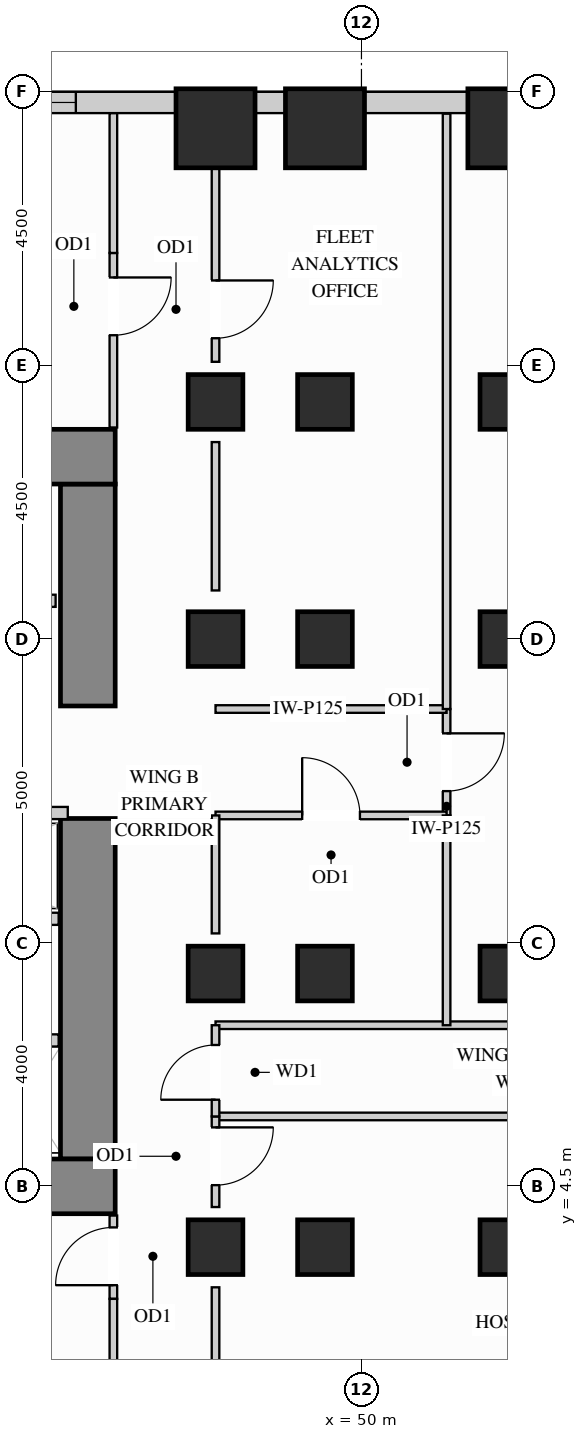
"""IFC4 building model, lengths in metres.
Left out: names, types, materials, properties, quantities, classifications, styles, units other than length and angle.
Written with IfcOpenShell. Run it as: python <this file> out.ifc"""

import sys

from ifc_helpers import new_model, si_unit, direction, frame, frame_2d, origin, origin_2d, place, context, subcontext, project, spatial, rectangle, extrude, source, transform, mapped, element, fill, save


model = new_model("IFC4")
c1 = context("Model", 3, precision=1e-05, world=origin(), true_north=direction((0.0, 1.0)))
c2 = subcontext(c1, "Body", "Model", "MODEL_VIEW")
j1 = project(units=[si_unit("LENGTHUNIT", "METRE"), si_unit("PLANEANGLEUNIT", "RADIAN")], contexts=[c1])
p1 = place(None, origin())
s1 = spatial("IfcSite", under=j1, at=p1, CompositionType="ELEMENT")
p2 = place(p1, origin())
s2 = spatial("IfcBuilding", under=s1, at=p2, CompositionType="ELEMENT")
p3 = place(p2, frame((0.0, 0.0, 40.5)))
s3 = spatial("IfcBuildingStorey", under=s2, at=p3, CompositionType="ELEMENT", Elevation=40.5)
m1 = source(origin(), c2, "Body", "SweptSolid", [
    extrude(rectangle(XDim=0.9, YDim=0.9, at=origin_2d()), origin(), (0.0, 0.0, 1.0), 3.38),
])
for number, where, z_axis, x_axis in (
    (1, (47.6, 13.5, 0.0), (0.0, 0.0, 1.0), (1.0, 0.0, 0.0)),
    (2, (47.6, 3.5, 0.0), (0.0, 0.0, 1.0), (1.0, 0.0, 0.0)),
    (3, (47.6, 8.0, 0.0), (0.0, 0.0, 1.0), (1.0, 0.0, 0.0)),
    (4, (47.6, 17.4, 0.0), (0.0, 0.0, 1.0), (1.0, 0.0, 0.0)),
    (5, (49.4, 13.5, 0.0), (0.0, 0.0, 1.0), (1.0, 0.0, 0.0)),
    (6, (49.4, 17.4, 0.0), (0.0, 0.0, 1.0), (1.0, 0.0, 0.0)),
    (7, (49.4, 3.5, 0.0), (0.0, 0.0, 1.0), (1.0, 0.0, 0.0)),
    (8, (49.4, 8.0, 0.0), (0.0, 0.0, 1.0), (1.0, 0.0, 0.0)),
    (9, (52.4, 13.5, 0.0), (0.0, 0.0, 1.0), (1.0, 0.0, 0.0)),
    (10, (52.4, 17.4, 0.0), (0.0, 0.0, 1.0), (1.0, 0.0, 0.0)),
    (11, (52.4, 3.5, 0.0), (0.0, 0.0, 1.0), (1.0, 0.0, 0.0)),
    (12, (52.4, 8.0, 0.0), (0.0, 0.0, 1.0), (1.0, 0.0, 0.0)),
):
    element("IfcColumn", number, at=place(p3, frame(where, z_axis=z_axis, x_axis=x_axis)), inside=s3, PredefinedType="COLUMN", context=c2, shape_type="MappedRepresentation", body=[
        mapped(m1, transform((0.0, 0.0, 0.0), x_axis=(1.0, 0.0, 0.0), y_axis=(0.0, 1.0, 0.0), z_axis=(0.0, 0.0, 1.0))),
    ])
m2 = source(origin(), c2, "Body", "SweptSolid", [
    extrude(rectangle(XDim=1.3, YDim=1.3, at=origin_2d()), origin(), (0.0, 0.0, 1.0), 3.38),
])
for number, where, z_axis, x_axis in (
    (13, (47.6, 21.9, 0.0), (0.0, 0.0, 1.0), (1.0, 0.0, 0.0)),
    (14, (49.4, 21.9, 0.0), (0.0, 0.0, 1.0), (1.0, 0.0, 0.0)),
    (15, (52.4, 21.9, 0.0), (0.0, 0.0, 1.0), (1.0, 0.0, 0.0)),
):
    element("IfcColumn", number, at=place(p3, frame(where, z_axis=z_axis, x_axis=x_axis)), inside=s3, PredefinedType="COLUMN", context=c2, shape_type="MappedRepresentation", body=[
        mapped(m2, transform((0.0, 0.0, 0.0), x_axis=(1.0, 0.0, 0.0), y_axis=(0.0, 1.0, 0.0), z_axis=(0.0, 0.0, 1.0))),
    ])
m3 = source(origin(), c2, "Body", "SweptSolid", [
    extrude(rectangle(XDim=5.6, YDim=0.9, at=frame_2d((2.8, 0.0))), origin(), (0.0, 0.0, 1.0), 3.38),
])
p4 = place(p3, frame((45.5, 4.95, 0.0), z_axis=(0.0, 0.0, 1.0), x_axis=(0.0, 1.0, 0.0)))
e16 = element("IfcWall", 16, at=p4, inside=s3, PredefinedType="SHEAR", context=c2, shape_type="MappedRepresentation", body=[
    mapped(m3, transform((0.0, 0.0, 0.0), x_axis=(1.0, 0.0, 0.0), y_axis=(0.0, 1.0, 0.0), z_axis=(0.0, 0.0, 1.0))),
])
m4 = source(origin(), c2, "Body", "SweptSolid", [
    extrude(rectangle(XDim=3.65, YDim=0.9, at=frame_2d((1.825, 0.0))), origin(), (0.0, 0.0, 1.0), 3.38),
])
p5 = place(p3, frame((45.5, 12.4, 0.0), z_axis=(0.0, 0.0, 1.0), x_axis=(0.0, 1.0, 0.0)))
e17 = element("IfcWall", 17, at=p5, inside=s3, PredefinedType="SHEAR", context=c2, shape_type="MappedRepresentation", body=[
    mapped(m4, transform((0.0, 0.0, 0.0), x_axis=(1.0, 0.0, 0.0), y_axis=(0.0, 1.0, 0.0), z_axis=(0.0, 0.0, 1.0))),
])
m5 = source(origin(), c2, "Body", "SweptSolid", [
    extrude(rectangle(XDim=10.4, YDim=0.9, at=frame_2d((5.2, 0.0))), origin(), (0.0, 0.0, 1.0), 3.38),
])
for number, where, z_axis, x_axis in (
    (18, (35.55, 16.5, 0.0), (0.0, 0.0, 1.0), (1.0, 0.0, 0.0)),
    (19, (35.55, 4.5, 0.0), (0.0, 0.0, 1.0), (1.0, 0.0, 0.0)),
):
    element("IfcWall", number, at=place(p3, frame(where, z_axis=z_axis, x_axis=x_axis)), inside=s3, PredefinedType="SHEAR", context=c2, shape_type="MappedRepresentation", body=[
        mapped(m5, transform((0.0, 0.0, 0.0), x_axis=(1.0, 0.0, 0.0), y_axis=(0.0, 1.0, 0.0), z_axis=(0.0, 0.0, 1.0))),
    ])
m6 = source(origin(), c2, "Body", "SweptSolid", [
    extrude(rectangle(XDim=1.704, YDim=0.35, at=frame_2d((0.852, 0.0))), origin(), (0.0, 0.0, 1.0), 2.51),
])
p6 = place(p3, frame((51.752, 22.325, 0.0), z_axis=(0.0, 0.0, 1.0), x_axis=(-1.0, 0.0, 0.0)))
e20 = element("IfcWall", 20, at=p6, inside=s3, PredefinedType="SOLIDWALL", context=c2, shape_type="MappedRepresentation", body=[
    mapped(m6, transform((0.0, 0.0, 0.0), x_axis=(1.0, 0.0, 0.0), y_axis=(0.0, 1.0, 0.0), z_axis=(0.0, 0.0, 1.0))),
])
m7 = source(origin(), c2, "Body", "SweptSolid", [
    extrude(rectangle(XDim=0.504, YDim=0.35, at=frame_2d((0.252, 0.0))), origin(), (0.0, 0.0, 1.0), 3.365),
])
p7 = place(p3, frame((48.752, 22.325, 0.0), z_axis=(0.0, 0.0, 1.0), x_axis=(-1.0, 0.0, 0.0)))
e21 = element("IfcWall", 21, at=p7, inside=s3, PredefinedType="SOLIDWALL", context=c2, shape_type="MappedRepresentation", body=[
    mapped(m7, transform((0.0, 0.0, 0.0), x_axis=(1.0, 0.0, 0.0), y_axis=(0.0, 1.0, 0.0), z_axis=(0.0, 0.0, 1.0))),
])
p8 = place(p3, frame((46.952, 22.325, 0.0), z_axis=(0.0, 0.0, 1.0), x_axis=(-1.0, 0.0, 0.0)))
e22 = element("IfcWall", 22, at=p8, inside=s3, PredefinedType="SOLIDWALL", context=c2, shape_type="SweptSolid", body=[
    extrude(rectangle(XDim=6.304, YDim=0.35, at=frame_2d((3.152, 0.0))), origin(), (0.0, 0.0, 1.0), 2.51),
])
p9 = place(p8, frame((1.649, 0.0, 0.78)))
e23 = element("IfcOpeningElement", 23, at=p9, cuts=e22, PredefinedType="OPENING", context=c2, shape_type="SweptSolid", body=[
    extrude(rectangle(XDim=1.8, YDim=1.55, at=frame_2d((0.9, 0.775))), frame((0.0, 0.185, 0.0), z_axis=(0.0, -1.0, 0.0), x_axis=(1.0, 0.0, 0.0)), (0.0, 0.0, 1.0), 0.37),
])
p10 = place(p8, frame((3.817, 0.0, 0.78)))
e24 = element("IfcOpeningElement", 24, at=p10, cuts=e22, PredefinedType="OPENING", context=c2, shape_type="SweptSolid", body=[
    extrude(rectangle(XDim=1.8, YDim=1.55, at=frame_2d((0.9, 0.775))), frame((0.0, 0.185, 0.0), z_axis=(0.0, -1.0, 0.0), x_axis=(1.0, 0.0, 0.0)), (0.0, 0.0, 1.0), 0.37),
])
p11 = place(p3, frame((51.4, 10.6, 0.0), z_axis=(0.0, 0.0, 1.0), x_axis=(0.0, 1.0, 0.0)))
e25 = element("IfcWall", 25, at=p11, inside=s3, PredefinedType="PARTITIONING", context=c2, shape_type="SweptSolid", body=[
    extrude(rectangle(XDim=1.75, YDim=0.125, at=frame_2d((0.875, 0.0))), origin(), (0.0, 0.0, 1.0), 3.365),
])
p12 = place(p11, frame((0.4, 0.0, 0.0)))
e26 = element("IfcOpeningElement", 26, at=p12, cuts=e25, PredefinedType="OPENING", context=c2, shape_type="SweptSolid", body=[
    extrude(rectangle(XDim=0.95, YDim=2.15, at=frame_2d((0.475, 1.075))), frame((0.0, 0.073, 0.0), z_axis=(0.0, -1.0, 0.0), x_axis=(1.0, 0.0, 0.0)), (0.0, 0.0, 1.0), 0.145),
])
m8 = source(origin(), c2, "Body", "SweptSolid", [
    extrude(rectangle(XDim=11.048, YDim=0.125, at=frame_2d((5.524, 0.0))), origin(), (0.0, 0.0, 1.0), 3.365),
])
for number, where, z_axis, x_axis in (
    (27, (47.6, 5.65, 0.0), (0.0, 0.0, 1.0), (1.0, 0.0, 0.0)),
    (28, (47.6, 7.15, 0.0), (0.0, 0.0, 1.0), (1.0, 0.0, 0.0)),
):
    element("IfcWall", number, at=place(p3, frame(where, z_axis=z_axis, x_axis=x_axis)), inside=s3, PredefinedType="PARTITIONING", context=c2, shape_type="MappedRepresentation", body=[
        mapped(m8, transform((0.0, 0.0, 0.0), x_axis=(1.0, 0.0, 0.0), y_axis=(0.0, 1.0, 0.0), z_axis=(0.0, 0.0, 1.0))),
    ])
m9 = source(origin(), c2, "Body", "SweptSolid", [
    extrude(rectangle(XDim=3.8, YDim=0.125, at=frame_2d((1.9, 0.0))), origin(), (0.0, 0.0, 1.0), 3.365),
])
p13 = place(p3, frame((47.6, 12.35, 0.0), z_axis=(0.0, 0.0, 1.0), x_axis=(1.0, 0.0, 0.0)))
e29 = element("IfcWall", 29, at=p13, inside=s3, PredefinedType="PARTITIONING", context=c2, shape_type="MappedRepresentation", body=[
    mapped(m9, transform((0.0, 0.0, 0.0), x_axis=(1.0, 0.0, 0.0), y_axis=(0.0, 1.0, 0.0), z_axis=(0.0, 0.0, 1.0))),
])
p14 = place(p3, frame((47.6, 10.6, 0.0), z_axis=(0.0, 0.0, 1.0), x_axis=(1.0, 0.0, 0.0)))
e30 = element("IfcWall", 30, at=p14, inside=s3, PredefinedType="PARTITIONING", context=c2, shape_type="SweptSolid", body=[
    extrude(rectangle(XDim=3.8, YDim=0.125, at=frame_2d((1.9, 0.0))), origin(), (0.0, 0.0, 1.0), 2.67),
])
p15 = place(p14, frame((1.425, 0.0, 0.0)))
e31 = element("IfcOpeningElement", 31, at=p15, cuts=e30, PredefinedType="OPENING", context=c2, shape_type="SweptSolid", body=[
    extrude(rectangle(XDim=0.95, YDim=2.15, at=frame_2d((0.475, 1.075))), frame((0.0, 0.073, 0.0), z_axis=(0.0, -1.0, 0.0), x_axis=(1.0, 0.0, 0.0)), (0.0, 0.0, 1.0), 0.145),
])
m10 = source(origin(), c2, "Body", "SweptSolid", [
    extrude(rectangle(XDim=3.45, YDim=0.125, at=frame_2d((1.725, 0.0))), origin(), (0.0, 0.0, 1.0), 3.365),
])
p16 = place(p3, frame((51.4, 7.15, 0.0), z_axis=(0.0, 0.0, 1.0), x_axis=(0.0, 1.0, 0.0)))
e32 = element("IfcWall", 32, at=p16, inside=s3, PredefinedType="PARTITIONING", context=c2, shape_type="MappedRepresentation", body=[
    mapped(m10, transform((0.0, 0.0, 0.0), x_axis=(1.0, 0.0, 0.0), y_axis=(0.0, 1.0, 0.0), z_axis=(0.0, 0.0, 1.0))),
])
m11 = source(origin(), c2, "Body", "SweptSolid", [
    extrude(rectangle(XDim=9.79, YDim=0.125, at=frame_2d((4.895, 0.0))), origin(), (0.0, 0.0, 1.0), 3.365),
])
p17 = place(p3, frame((51.4, 12.35, 0.0), z_axis=(0.0, 0.0, 1.0), x_axis=(0.0, 1.0, 0.0)))
e33 = element("IfcWall", 33, at=p17, inside=s3, PredefinedType="PARTITIONING", context=c2, shape_type="MappedRepresentation", body=[
    mapped(m11, transform((0.0, 0.0, 0.0), x_axis=(1.0, 0.0, 0.0), y_axis=(0.0, 1.0, 0.0), z_axis=(0.0, 0.0, 1.0))),
])
p18 = place(p3, frame((47.6, 4.16, 0.0), z_axis=(0.0, 0.0, 1.0), x_axis=(0.0, 1.0, 0.0)))
e34 = element("IfcWall", 34, at=p18, inside=s3, PredefinedType="PARTITIONING", context=c2, shape_type="SweptSolid", body=[
    extrude(rectangle(XDim=1.49, YDim=0.125, at=frame_2d((0.745, 0.0))), origin(), (0.0, 0.0, 1.0), 2.67),
])
p19 = place(p18, frame((0.36, 0.0, 0.0)))
e35 = element("IfcOpeningElement", 35, at=p19, cuts=e34, PredefinedType="OPENING", context=c2, shape_type="SweptSolid", body=[
    extrude(rectangle(XDim=0.95, YDim=2.15, at=frame_2d((0.475, 1.075))), frame((0.0, 0.073, 0.0), z_axis=(0.0, -1.0, 0.0), x_axis=(1.0, 0.0, 0.0)), (0.0, 0.0, 1.0), 0.145),
])
m12 = source(origin(), c2, "Body", "SweptSolid", [
    extrude(rectangle(XDim=1.58, YDim=0.125, at=frame_2d((0.79, 0.0))), origin(), (0.0, 0.0, 1.0), 2.67),
])
p20 = place(p3, frame((47.6, 1.26, 0.0), z_axis=(0.0, 0.0, 1.0), x_axis=(0.0, 1.0, 0.0)))
e36 = element("IfcWall", 36, at=p20, inside=s3, PredefinedType="PARTITIONING", context=c2, shape_type="MappedRepresentation", body=[
    mapped(m12, transform((0.0, 0.0, 0.0), x_axis=(1.0, 0.0, 0.0), y_axis=(0.0, 1.0, 0.0), z_axis=(0.0, 0.0, 1.0))),
])
m13 = source(origin(), c2, "Body", "SweptSolid", [
    extrude(rectangle(XDim=1.94, YDim=0.125, at=frame_2d((0.97, 0.0))), origin(), (0.0, 0.0, 1.0), 2.67),
])
p21 = place(p3, frame((47.6, 8.66, 0.0), z_axis=(0.0, 0.0, 1.0), x_axis=(0.0, 1.0, 0.0)))
e37 = element("IfcWall", 37, at=p21, inside=s3, PredefinedType="PARTITIONING", context=c2, shape_type="MappedRepresentation", body=[
    mapped(m13, transform((0.0, 0.0, 0.0), x_axis=(1.0, 0.0, 0.0), y_axis=(0.0, 1.0, 0.0), z_axis=(0.0, 0.0, 1.0))),
])
m14 = source(origin(), c2, "Body", "SweptSolid", [
    extrude(rectangle(XDim=2.44, YDim=0.125, at=frame_2d((1.22, 0.0))), origin(), (0.0, 0.0, 1.0), 2.67),
])
p22 = place(p3, frame((47.6, 14.3, 0.0), z_axis=(0.0, 0.0, 1.0), x_axis=(0.0, 1.0, 0.0)))
e38 = element("IfcWall", 38, at=p22, inside=s3, PredefinedType="PARTITIONING", context=c2, shape_type="MappedRepresentation", body=[
    mapped(m14, transform((0.0, 0.0, 0.0), x_axis=(1.0, 0.0, 0.0), y_axis=(0.0, 1.0, 0.0), z_axis=(0.0, 0.0, 1.0))),
])
p23 = place(p3, frame((47.6, 18.06, 0.0), z_axis=(0.0, 0.0, 1.0), x_axis=(0.0, 1.0, 0.0)))
e39 = element("IfcWall", 39, at=p23, inside=s3, PredefinedType="PARTITIONING", context=c2, shape_type="SweptSolid", body=[
    extrude(rectangle(XDim=3.18, YDim=0.125, at=frame_2d((1.59, 0.0))), origin(), (0.0, 0.0, 1.0), 2.67),
])
p24 = place(p23, frame((0.388, 0.0, 0.0)))
e40 = element("IfcOpeningElement", 40, at=p24, cuts=e39, PredefinedType="OPENING", context=c2, shape_type="SweptSolid", body=[
    extrude(rectangle(XDim=0.95, YDim=2.15, at=frame_2d((0.475, 1.075))), frame((0.0, 0.073, 0.0), z_axis=(0.0, -1.0, 0.0), x_axis=(1.0, 0.0, 0.0)), (0.0, 0.0, 1.0), 0.145),
])
p25 = place(p3, frame((47.6, 5.65, 0.0), z_axis=(0.0, 0.0, 1.0), x_axis=(0.0, 1.0, 0.0)))
e41 = element("IfcWall", 41, at=p25, inside=s3, PredefinedType="PARTITIONING", context=c2, shape_type="SweptSolid", body=[
    extrude(rectangle(XDim=1.5, YDim=0.125, at=frame_2d((0.75, 0.0))), origin(), (0.0, 0.0, 1.0), 2.67),
])
p26 = place(p25, frame((0.275, 0.0, 0.0)))
e42 = element("IfcOpeningElement", 42, at=p26, cuts=e41, PredefinedType="OPENING", context=c2, shape_type="SweptSolid", body=[
    extrude(rectangle(XDim=0.9, YDim=2.15, at=frame_2d((0.45, 1.075))), frame((0.0, 0.073, 0.0), z_axis=(0.0, -1.0, 0.0), x_axis=(1.0, 0.0, 0.0)), (0.0, 0.0, 1.0), 0.145),
])
p27 = place(p3, frame((45.92, 16.98, 0.0), z_axis=(0.0, 0.0, 1.0), x_axis=(0.0, 1.0, 0.0)))
e43 = element("IfcWall", 43, at=p27, inside=s3, PredefinedType="PARTITIONING", context=c2, shape_type="SweptSolid", body=[
    extrude(rectangle(XDim=2.87, YDim=0.125, at=frame_2d((1.435, 0.0))), origin(), (0.0, 0.0, 1.0), 3.365),
])
p28 = place(p27, frame((1.517, 0.0, 0.0)))
e44 = element("IfcOpeningElement", 44, at=p28, cuts=e43, PredefinedType="OPENING", context=c2, shape_type="SweptSolid", body=[
    extrude(rectangle(XDim=0.95, YDim=2.15, at=frame_2d((0.475, 1.075))), frame((0.0, 0.073, 0.0), z_axis=(0.0, -1.0, 0.0), x_axis=(1.0, 0.0, 0.0)), (0.0, 0.0, 1.0), 0.145),
])
m15 = source(origin(), c2, "Body", "SweptSolid", [
    extrude(rectangle(XDim=2.298, YDim=0.125, at=frame_2d((1.149, 0.0))), origin(), (0.0, 0.0, 1.0), 3.365),
])
p29 = place(p3, frame((45.92, 19.85, 0.0), z_axis=(0.0, 0.0, 1.0), x_axis=(0.0, 1.0, 0.0)))
e45 = element("IfcWall", 45, at=p29, inside=s3, PredefinedType="PARTITIONING", context=c2, shape_type="MappedRepresentation", body=[
    mapped(m15, transform((0.0, 0.0, 0.0), x_axis=(1.0, 0.0, 0.0), y_axis=(0.0, 1.0, 0.0), z_axis=(0.0, 0.0, 1.0))),
])
p30 = place(p3, frame((45.92, 2.65, 0.0), z_axis=(0.0, 0.0, 1.0), x_axis=(0.0, 1.0, 0.0)))
e46 = element("IfcWall", 46, at=p30, inside=s3, PredefinedType="PARTITIONING", context=c2, shape_type="SweptSolid", body=[
    extrude(rectangle(XDim=1.37, YDim=0.125, at=frame_2d((0.685, 0.0))), origin(), (0.0, 0.0, 1.0), 3.365),
])
p31 = place(p30, frame((0.225, 0.0, 0.0)))
e47 = element("IfcOpeningElement", 47, at=p31, cuts=e46, PredefinedType="OPENING", context=c2, shape_type="SweptSolid", body=[
    extrude(rectangle(XDim=0.95, YDim=2.15, at=frame_2d((0.475, 1.075))), frame((0.0, 0.073, 0.0), z_axis=(0.0, -1.0, 0.0), x_axis=(1.0, 0.0, 0.0)), (0.0, 0.0, 1.0), 0.145),
])
p32 = place(p3, frame((45.92, 0.352, 0.0), z_axis=(0.0, 0.0, 1.0), x_axis=(0.0, 1.0, 0.0)))
e48 = element("IfcWall", 48, at=p32, inside=s3, PredefinedType="PARTITIONING", context=c2, shape_type="MappedRepresentation", body=[
    mapped(m15, transform((0.0, 0.0, 0.0), x_axis=(1.0, 0.0, 0.0), y_axis=(0.0, 1.0, 0.0), z_axis=(0.0, 0.0, 1.0))),
])
m16 = source(origin(), c2, "Body", "SweptSolid", [
    extrude(rectangle(XDim=1.17, YDim=0.2, at=frame_2d((0.585, 0.0))), origin(), (0.0, 0.0, 1.0), 3.365),
])
p33 = place(p3, frame((43.85, 6.9, 0.0), z_axis=(0.0, 0.0, 1.0), x_axis=(1.0, 0.0, 0.0)))
e49 = element("IfcWall", 49, at=p33, inside=s3, PredefinedType="PARTITIONING", context=c2, shape_type="MappedRepresentation", body=[
    mapped(m16, transform((0.0, 0.0, 0.0), x_axis=(1.0, 0.0, 0.0), y_axis=(0.0, 1.0, 0.0), z_axis=(0.0, 0.0, 1.0))),
])
p34 = place(p3, frame((42.23, 14.13, 0.0), z_axis=(0.0, 0.0, 1.0), x_axis=(1.0, 0.0, 0.0)))
e50 = element("IfcWall", 50, at=p34, inside=s3, PredefinedType="PARTITIONING", context=c2, shape_type="SweptSolid", body=[
    extrude(rectangle(XDim=2.74, YDim=0.2, at=frame_2d((1.37, 0.0))), origin(), (0.0, 0.0, 1.0), 3.365),
])
p35 = place(p34, frame((0.82, 0.0, 0.0)))
e51 = element("IfcOpeningElement", 51, at=p35, cuts=e50, PredefinedType="OPENING", context=c2, shape_type="SweptSolid", body=[
    extrude(rectangle(XDim=1.1, YDim=2.2, at=frame_2d((0.55, 1.1))), frame((0.0, 0.11, 0.0), z_axis=(0.0, -1.0, 0.0), x_axis=(1.0, 0.0, 0.0)), (0.0, 0.0, 1.0), 0.22),
])
m17 = source(origin(), c2, "Body", "SweptSolid", [
    extrude(rectangle(XDim=3.49, YDim=0.2, at=frame_2d((1.745, 0.0))), origin(), (0.0, 0.0, 1.0), 3.365),
])
p36 = place(p3, frame((41.68, 10.64, 0.0), z_axis=(0.0, 0.0, 1.0), x_axis=(1.0, 0.0, 0.0)))
e52 = element("IfcWall", 52, at=p36, inside=s3, PredefinedType="PARTITIONING", context=c2, shape_type="MappedRepresentation", body=[
    mapped(m17, transform((0.0, 0.0, 0.0), x_axis=(1.0, 0.0, 0.0), y_axis=(0.0, 1.0, 0.0), z_axis=(0.0, 0.0, 1.0))),
])
m18 = source(origin(), c2, "Body", "SweptSolid", [
    extrude(rectangle(XDim=3.34, YDim=0.2, at=frame_2d((1.67, 0.0))), origin(), (0.0, 0.0, 1.0), 3.365),
])
p37 = place(p3, frame((41.68, 8.9, 0.0), z_axis=(0.0, 0.0, 1.0), x_axis=(1.0, 0.0, 0.0)))
e53 = element("IfcWall", 53, at=p37, inside=s3, PredefinedType="PARTITIONING", context=c2, shape_type="MappedRepresentation", body=[
    mapped(m18, transform((0.0, 0.0, 0.0), x_axis=(1.0, 0.0, 0.0), y_axis=(0.0, 1.0, 0.0), z_axis=(0.0, 0.0, 1.0))),
])
m19 = source(origin(), c2, "Body", "SweptSolid", [
    extrude(rectangle(XDim=0.95, YDim=2.15, at=frame_2d((0.475, 1.075))), frame((0.0, 0.025, 0.0), z_axis=(0.0, -1.0, 0.0), x_axis=(1.0, 0.0, 0.0)), (0.0, 0.0, 1.0), 0.05),
])
p38 = place(p28, origin())
e54 = element("IfcDoor", 54, at=p38, inside=s3, OperationType="SINGLE_SWING_RIGHT", PredefinedType="DOOR", context=c2, shape_type="MappedRepresentation", body=[
    mapped(m19, transform((0.0, 0.0, 0.0), x_axis=(1.0, 0.0, 0.0), y_axis=(0.0, 1.0, 0.0), z_axis=(0.0, 0.0, 1.0))),
])
fill(e44, e54)
p39 = place(p31, origin())
e55 = element("IfcDoor", 55, at=p39, inside=s3, OperationType="SINGLE_SWING_LEFT", PredefinedType="DOOR", context=c2, shape_type="MappedRepresentation", body=[
    mapped(m19, transform((0.0, 0.0, 0.0), x_axis=(1.0, 0.0, 0.0), y_axis=(0.0, 1.0, 0.0), z_axis=(0.0, 0.0, 1.0))),
])
fill(e47, e55)
p40 = place(p19, origin())
e56 = element("IfcDoor", 56, at=p40, inside=s3, OperationType="SINGLE_SWING_RIGHT", PredefinedType="DOOR", context=c2, shape_type="MappedRepresentation", body=[
    mapped(m19, transform((0.0, 0.0, 0.0), x_axis=(1.0, 0.0, 0.0), y_axis=(0.0, 1.0, 0.0), z_axis=(0.0, 0.0, 1.0))),
])
fill(e35, e56)
p41 = place(p15, origin())
e57 = element("IfcDoor", 57, at=p41, inside=s3, OperationType="SINGLE_SWING_LEFT", PredefinedType="DOOR", context=c2, shape_type="MappedRepresentation", body=[
    mapped(m19, transform((0.0, 0.0, 0.0), x_axis=(1.0, 0.0, 0.0), y_axis=(0.0, 1.0, 0.0), z_axis=(0.0, 0.0, 1.0))),
])
fill(e31, e57)
p42 = place(p12, origin())
e58 = element("IfcDoor", 58, at=p42, inside=s3, OperationType="SINGLE_SWING_RIGHT", PredefinedType="DOOR", context=c2, shape_type="MappedRepresentation", body=[
    mapped(m19, transform((0.0, 0.0, 0.0), x_axis=(1.0, 0.0, 0.0), y_axis=(0.0, 1.0, 0.0), z_axis=(0.0, 0.0, 1.0))),
])
fill(e26, e58)
p43 = place(p24, origin())
e59 = element("IfcDoor", 59, at=p43, inside=s3, OperationType="SINGLE_SWING_RIGHT", PredefinedType="DOOR", context=c2, shape_type="MappedRepresentation", body=[
    mapped(m19, transform((0.0, 0.0, 0.0), x_axis=(1.0, 0.0, 0.0), y_axis=(0.0, 1.0, 0.0), z_axis=(0.0, 0.0, 1.0))),
])
fill(e40, e59)
m20 = source(origin(), c2, "Body", "SweptSolid", [
    extrude(rectangle(XDim=0.9, YDim=2.15, at=frame_2d((0.45, 1.075))), frame((0.0, 0.025, 0.0), z_axis=(0.0, -1.0, 0.0), x_axis=(1.0, 0.0, 0.0)), (0.0, 0.0, 1.0), 0.05),
])
p44 = place(p26, origin())
e60 = element("IfcDoor", 60, at=p44, inside=s3, OperationType="SINGLE_SWING_LEFT", PredefinedType="DOOR", context=c2, shape_type="MappedRepresentation", body=[
    mapped(m20, transform((0.0, 0.0, 0.0), x_axis=(1.0, 0.0, 0.0), y_axis=(0.0, 1.0, 0.0), z_axis=(0.0, 0.0, 1.0))),
])
fill(e42, e60)
m21 = source(origin(), c2, "Body", "SweptSolid", [
    extrude(rectangle(XDim=1.8, YDim=1.55, at=frame_2d((0.9, 0.775))), frame((0.0, 0.03, 0.0), z_axis=(0.0, -1.0, 0.0), x_axis=(1.0, 0.0, 0.0)), (0.0, 0.0, 1.0), 0.06),
])
p45 = place(p9, origin())
e61 = element("IfcWindow", 61, at=p45, inside=s3, PartitioningType="SINGLE_PANEL", PredefinedType="WINDOW", context=c2, shape_type="MappedRepresentation", body=[
    mapped(m21, transform((0.0, 0.0, 0.0), x_axis=(1.0, 0.0, 0.0), y_axis=(0.0, 1.0, 0.0), z_axis=(0.0, 0.0, 1.0))),
])
fill(e23, e61)
save(model, sys.argv[1])
